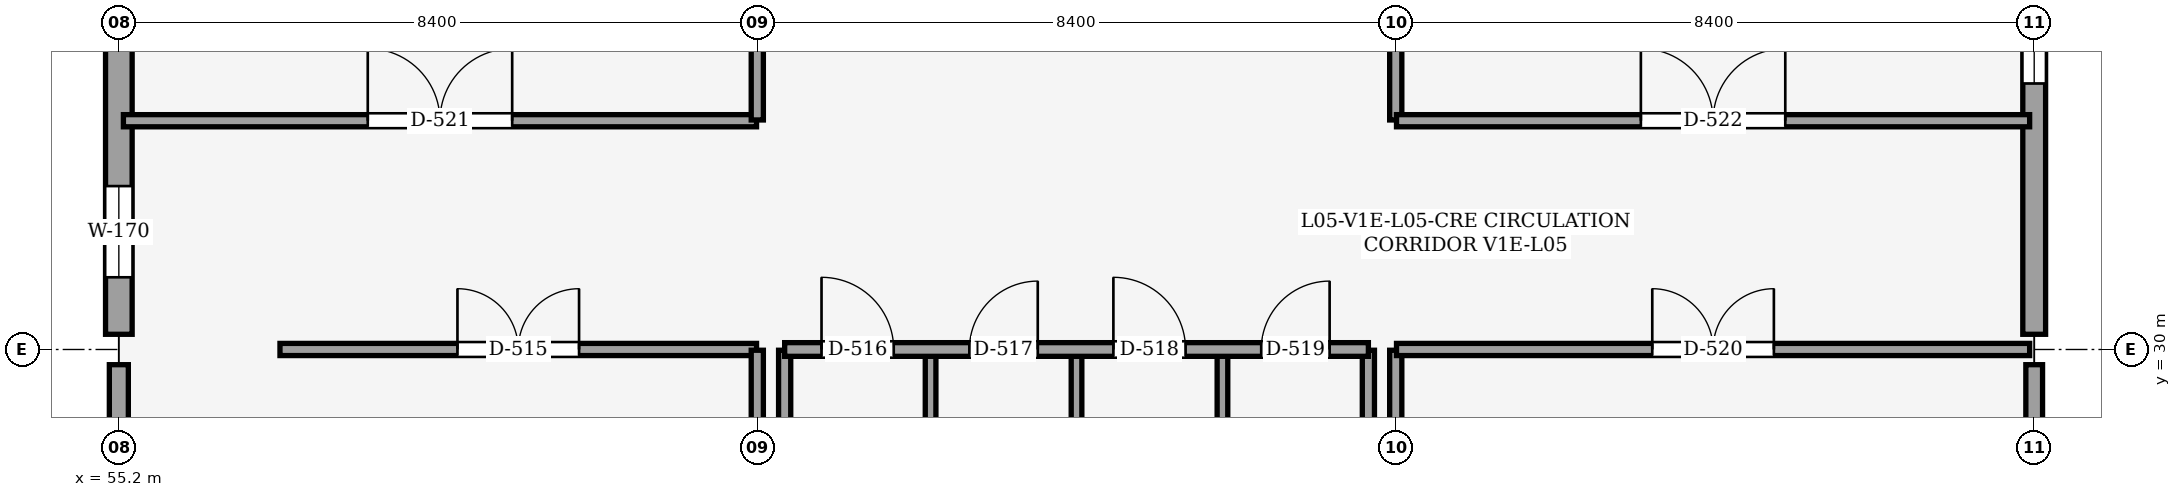
"""IFC4 building model, lengths in metres.
Left out: names, types, materials, properties, quantities, classifications, styles, units other than length and angle.
Written with IfcOpenShell. Run it as: python <this file> out.ifc"""

import sys

from ifc_helpers import new_model, si_unit, direction, frame, frame_2d, origin, place, context, subcontext, project, spatial, rectangle, extrude, element, fill, save


model = new_model("IFC4")
c1 = context("Model", 3, precision=1e-05, world=origin(), true_north=direction((0.0, 1.0)))
c2 = subcontext(c1, "Body", "Model", "MODEL_VIEW")
j1 = project(units=[si_unit("LENGTHUNIT", "METRE"), si_unit("PLANEANGLEUNIT", "RADIAN")], contexts=[c1])
p1 = place(None, origin())
s1 = spatial("IfcSite", under=j1, at=p1, CompositionType="ELEMENT")
p2 = place(p1, origin())
s2 = spatial("IfcBuilding", under=s1, at=p2, CompositionType="ELEMENT")
p3 = place(p2, frame((0.0, 0.0, 24.6)))
s3 = spatial("IfcBuildingStorey", under=s2, at=p3, CompositionType="ELEMENT", Elevation=24.6)
p4 = place(p3, frame((55.2, 21.752, 0.0), z_axis=(0.0, 0.0, 1.0), x_axis=(0.0, 1.0, 0.0)))
e1 = element("IfcWall", 1, at=p4, inside=s3, PredefinedType="SOLIDWALL", context=c2, shape_type="SweptSolid", body=[
    extrude(rectangle(XDim=8.048, YDim=0.25, at=frame_2d((4.024, 0.0))), origin(), (0.0, 0.0, 1.0), 3.524),
])
p5 = place(p4, frame((0.75, 0.0, 0.9)))
e2 = element("IfcOpeningElement", 2, at=p5, cuts=e1, PredefinedType="OPENING", context=c2, shape_type="SweptSolid", body=[
    extrude(rectangle(XDim=1.2, YDim=1.5, at=frame_2d((0.6, 0.75))), frame((0.0, 0.135, 0.0), z_axis=(0.0, -1.0, 0.0), x_axis=(1.0, 0.0, 0.0)), (0.0, 0.0, 1.0), 0.271),
])
p6 = place(p3, frame((55.2, 30.2, 0.0), z_axis=(0.0, 0.0, 1.0), x_axis=(0.0, 1.0, 0.0)))
e3 = element("IfcWall", 3, at=p6, inside=s3, PredefinedType="SOLIDWALL", context=c2, shape_type="SweptSolid", body=[
    extrude(rectangle(XDim=8.0, YDim=0.35, at=frame_2d((4.0, 0.0))), origin(), (0.0, 0.0, 1.0), 3.524),
])
p7 = place(p6, frame((0.75, 0.0, 0.9)))
e4 = element("IfcOpeningElement", 4, at=p7, cuts=e3, PredefinedType="OPENING", context=c2, shape_type="SweptSolid", body=[
    extrude(rectangle(XDim=1.2, YDim=1.5, at=frame_2d((0.6, 0.75))), frame((0.0, 0.185, 0.0), z_axis=(0.0, -1.0, 0.0), x_axis=(1.0, 0.0, 0.0)), (0.0, 0.0, 1.0), 0.371),
])
p8 = place(p3, frame((80.4, 29.8, 0.0), z_axis=(0.0, 0.0, 1.0), x_axis=(0.0, -1.0, 0.0)))
e5 = element("IfcWall", 5, at=p8, inside=s3, PredefinedType="SOLIDWALL", context=c2, shape_type="SweptSolid", body=[
    extrude(rectangle(XDim=8.098, YDim=0.22, at=frame_2d((4.049, 0.0))), origin(), (0.0, 0.0, 1.0), 3.524),
])
p9 = place(p8, frame((0.75, 0.0, 0.9)))
e6 = element("IfcOpeningElement", 6, at=p9, cuts=e5, PredefinedType="OPENING", context=c2, shape_type="SweptSolid", body=[
    extrude(rectangle(XDim=1.2, YDim=1.5, at=frame_2d((0.6, 0.75))), frame((0.0, 0.12, 0.0), z_axis=(0.0, -1.0, 0.0), x_axis=(1.0, 0.0, 0.0)), (0.0, 0.0, 1.0), 0.24),
])
p10 = place(p3, frame((80.4, 38.2, 0.0), z_axis=(0.0, 0.0, 1.0), x_axis=(0.0, -1.0, 0.0)))
e7 = element("IfcWall", 7, at=p10, inside=s3, PredefinedType="SOLIDWALL", context=c2, shape_type="SweptSolid", body=[
    extrude(rectangle(XDim=8.0, YDim=0.3, at=frame_2d((4.0, 0.0))), origin(), (0.0, 0.0, 1.0), 3.524),
])
p11 = place(p10, frame((3.3, 0.0, 0.9)))
e8 = element("IfcOpeningElement", 8, at=p11, cuts=e7, PredefinedType="OPENING", context=c2, shape_type="SweptSolid", body=[
    extrude(rectangle(XDim=1.4, YDim=1.75, at=frame_2d((0.7, 0.875))), frame((0.0, 0.16, 0.0), z_axis=(0.0, -1.0, 0.0), x_axis=(1.0, 0.0, 0.0)), (0.0, 0.0, 1.0), 0.321),
])
p12 = place(p3, frame((57.32, 30.0, 0.0), z_axis=(0.0, 0.0, 1.0), x_axis=(1.0, 0.0, 0.0)))
e9 = element("IfcWall", 9, at=p12, inside=s3, PredefinedType="PARTITIONING", context=c2, shape_type="SweptSolid", body=[
    extrude(rectangle(XDim=6.27, YDim=0.16, at=frame_2d((3.135, 0.0))), origin(), (0.0, 0.0, 1.0), 4.58),
])
p13 = place(p12, frame((2.335, 0.0, 0.0)))
e10 = element("IfcOpeningElement", 10, at=p13, cuts=e9, PredefinedType="OPENING", context=c2, shape_type="SweptSolid", body=[
    extrude(rectangle(XDim=1.6, YDim=2.35, at=frame_2d((0.8, 1.175))), frame((0.0, 0.09, 0.0), z_axis=(0.0, -1.0, 0.0), x_axis=(1.0, 0.0, 0.0)), (0.0, 0.0, 1.0), 0.18),
])
p14 = place(p3, frame((63.6, 21.767, 0.0), z_axis=(0.0, 0.0, 1.0), x_axis=(0.0, 1.0, 0.0)))
e11 = element("IfcWall", 11, at=p14, inside=s3, PredefinedType="PARTITIONING", context=c2, shape_type="SweptSolid", body=[
    extrude(rectangle(XDim=8.223, YDim=0.16, at=frame_2d((4.111, 0.0))), origin(), (0.0, 0.0, 1.0), 3.524),
])
for number, where, z_axis, x_axis in (
    (12, (65.88, 21.63, 0.0), (0.0, 0.0, 1.0), (0.0, 1.0, 0.0)),
    (13, (67.8, 21.63, 0.0), (0.0, 0.0, 1.0), (0.0, 1.0, 0.0)),
    (14, (69.72, 21.63, 0.0), (0.0, 0.0, 1.0), (0.0, 1.0, 0.0)),
):
    element("IfcWall", number, at=place(p3, frame(where, z_axis=z_axis, x_axis=x_axis)), inside=s3, PredefinedType="PARTITIONING", context=c2, shape_type="SweptSolid", body=[
        extrude(rectangle(XDim=8.36, YDim=0.14, at=frame_2d((4.18, 0.0))), origin(), (0.0, 0.0, 1.0), 4.58),
    ])
for number, where, z_axis, x_axis in (
    (15, (63.96, 21.63, 0.0), (0.0, 0.0, 1.0), (0.0, 1.0, 0.0)),
    (16, (71.64, 21.63, 0.0), (0.0, 0.0, 1.0), (0.0, 1.0, 0.0)),
):
    element("IfcWall", number, at=place(p3, frame(where, z_axis=z_axis, x_axis=x_axis)), inside=s3, PredefinedType="PARTITIONING", context=c2, shape_type="SweptSolid", body=[
        extrude(rectangle(XDim=8.36, YDim=0.16, at=frame_2d((4.18, 0.0))), origin(), (0.0, 0.0, 1.0), 4.58),
    ])
p15 = place(p3, frame((63.96, 30.0, 0.0), z_axis=(0.0, 0.0, 1.0), x_axis=(1.0, 0.0, 0.0)))
e17 = element("IfcWall", 17, at=p15, inside=s3, PredefinedType="PARTITIONING", context=c2, shape_type="SweptSolid", body=[
    extrude(rectangle(XDim=7.68, YDim=0.18, at=frame_2d((3.84, 0.0))), origin(), (0.0, 0.0, 1.0), 4.58),
])
p16 = place(p15, frame((0.485, 0.0, 0.0)))
e18 = element("IfcOpeningElement", 18, at=p16, cuts=e17, PredefinedType="OPENING", context=c2, shape_type="SweptSolid", body=[
    extrude(rectangle(XDim=0.95, YDim=2.1, at=frame_2d((0.475, 1.05))), frame((0.0, 0.1, 0.0), z_axis=(0.0, -1.0, 0.0), x_axis=(1.0, 0.0, 0.0)), (0.0, 0.0, 1.0), 0.2),
])
p17 = place(p15, frame((2.43, 0.0, 0.0)))
e19 = element("IfcOpeningElement", 19, at=p17, cuts=e17, PredefinedType="OPENING", context=c2, shape_type="SweptSolid", body=[
    extrude(rectangle(XDim=0.9, YDim=2.1, at=frame_2d((0.45, 1.05))), frame((0.0, 0.1, 0.0), z_axis=(0.0, -1.0, 0.0), x_axis=(1.0, 0.0, 0.0)), (0.0, 0.0, 1.0), 0.2),
])
p18 = place(p15, frame((4.325, 0.0, 0.0)))
e20 = element("IfcOpeningElement", 20, at=p18, cuts=e17, PredefinedType="OPENING", context=c2, shape_type="SweptSolid", body=[
    extrude(rectangle(XDim=0.95, YDim=2.1, at=frame_2d((0.475, 1.05))), frame((0.0, 0.1, 0.0), z_axis=(0.0, -1.0, 0.0), x_axis=(1.0, 0.0, 0.0)), (0.0, 0.0, 1.0), 0.2),
])
p19 = place(p15, frame((6.27, 0.0, 0.0)))
e21 = element("IfcOpeningElement", 21, at=p19, cuts=e17, PredefinedType="OPENING", context=c2, shape_type="SweptSolid", body=[
    extrude(rectangle(XDim=0.9, YDim=2.1, at=frame_2d((0.45, 1.05))), frame((0.0, 0.1, 0.0), z_axis=(0.0, -1.0, 0.0), x_axis=(1.0, 0.0, 0.0)), (0.0, 0.0, 1.0), 0.2),
])
p20 = place(p3, frame((72.0, 21.742, 0.0), z_axis=(0.0, 0.0, 1.0), x_axis=(0.0, 1.0, 0.0)))
e22 = element("IfcWall", 22, at=p20, inside=s3, PredefinedType="PARTITIONING", context=c2, shape_type="SweptSolid", body=[
    extrude(rectangle(XDim=8.248, YDim=0.16, at=frame_2d((4.124, 0.0))), origin(), (0.0, 0.0, 1.0), 3.524),
])
p21 = place(p3, frame((72.01, 30.0, 0.0), z_axis=(0.0, 0.0, 1.0), x_axis=(1.0, 0.0, 0.0)))
e23 = element("IfcWall", 23, at=p21, inside=s3, PredefinedType="PARTITIONING", context=c2, shape_type="SweptSolid", body=[
    extrude(rectangle(XDim=8.33, YDim=0.16, at=frame_2d((4.165, 0.0))), origin(), (0.0, 0.0, 1.0), 4.58),
])
p22 = place(p21, frame((3.365, 0.0, 0.0)))
e24 = element("IfcOpeningElement", 24, at=p22, cuts=e23, PredefinedType="OPENING", context=c2, shape_type="SweptSolid", body=[
    extrude(rectangle(XDim=1.6, YDim=2.35, at=frame_2d((0.8, 1.175))), frame((0.0, 0.09, 0.0), z_axis=(0.0, -1.0, 0.0), x_axis=(1.0, 0.0, 0.0)), (0.0, 0.0, 1.0), 0.18),
])
p23 = place(p3, frame((55.26, 33.01, 0.0), z_axis=(0.0, 0.0, 1.0), x_axis=(1.0, 0.0, 0.0)))
e25 = element("IfcWall", 25, at=p23, inside=s3, PredefinedType="PARTITIONING", context=c2, shape_type="SweptSolid", body=[
    extrude(rectangle(XDim=8.33, YDim=0.16, at=frame_2d((4.165, 0.0))), origin(), (0.0, 0.0, 1.0), 4.58),
])
p24 = place(p23, frame((3.215, 0.0, 0.0)))
e26 = element("IfcOpeningElement", 26, at=p24, cuts=e25, PredefinedType="OPENING", context=c2, shape_type="SweptSolid", body=[
    extrude(rectangle(XDim=1.9, YDim=2.45, at=frame_2d((0.95, 1.225))), frame((0.0, 0.09, 0.0), z_axis=(0.0, -1.0, 0.0), x_axis=(1.0, 0.0, 0.0)), (0.0, 0.0, 1.0), 0.18),
])
for number, where, z_axis, x_axis in (
    (27, (63.6, 33.02, 0.0), (0.0, 0.0, 1.0), (0.0, 1.0, 0.0)),
    (28, (72.0, 33.02, 0.0), (0.0, 0.0, 1.0), (0.0, 1.0, 0.0)),
):
    element("IfcWall", number, at=place(p3, frame(where, z_axis=z_axis, x_axis=x_axis)), inside=s3, PredefinedType="PARTITIONING", context=c2, shape_type="SweptSolid", body=[
        extrude(rectangle(XDim=5.35, YDim=0.16, at=frame_2d((2.675, 0.0))), origin(), (0.0, 0.0, 1.0), 3.524),
    ])
p25 = place(p3, frame((72.01, 33.01, 0.0), z_axis=(0.0, 0.0, 1.0), x_axis=(1.0, 0.0, 0.0)))
e29 = element("IfcWall", 29, at=p25, inside=s3, PredefinedType="PARTITIONING", context=c2, shape_type="SweptSolid", body=[
    extrude(rectangle(XDim=8.33, YDim=0.16, at=frame_2d((4.165, 0.0))), origin(), (0.0, 0.0, 1.0), 4.58),
])
p26 = place(p25, frame((3.215, 0.0, 0.0)))
e30 = element("IfcOpeningElement", 30, at=p26, cuts=e29, PredefinedType="OPENING", context=c2, shape_type="SweptSolid", body=[
    extrude(rectangle(XDim=1.9, YDim=2.45, at=frame_2d((0.95, 1.225))), frame((0.0, 0.09, 0.0), z_axis=(0.0, -1.0, 0.0), x_axis=(1.0, 0.0, 0.0)), (0.0, 0.0, 1.0), 0.18),
])
p27 = place(p7, origin())
e31 = element("IfcWindow", 31, at=p27, inside=s3, PartitioningType="SINGLE_PANEL", PredefinedType="WINDOW", context=c2, shape_type="SweptSolid", body=[
    extrude(rectangle(XDim=1.2, YDim=1.5, at=frame_2d((0.6, 0.75))), frame((0.0, 0.03, 0.0), z_axis=(0.0, -1.0, 0.0), x_axis=(1.0, 0.0, 0.0)), (0.0, 0.0, 1.0), 0.06),
])
fill(e4, e31)
p28 = place(p11, origin())
e32 = element("IfcWindow", 32, at=p28, inside=s3, PartitioningType="SINGLE_PANEL", PredefinedType="WINDOW", context=c2, shape_type="SweptSolid", body=[
    extrude(rectangle(XDim=1.4, YDim=1.75, at=frame_2d((0.7, 0.875))), frame((0.0, 0.03, 0.0), z_axis=(0.0, -1.0, 0.0), x_axis=(1.0, 0.0, 0.0)), (0.0, 0.0, 1.0), 0.06),
])
fill(e8, e32)
p29 = place(p13, origin())
e33 = element("IfcDoor", 33, at=p29, inside=s3, OperationType="DOUBLE_DOOR_SINGLE_SWING", PredefinedType="DOOR", context=c2, shape_type="SweptSolid", body=[
    extrude(rectangle(XDim=1.6, YDim=2.35, at=frame_2d((0.8, 1.175))), frame((0.0, 0.025, 0.0), z_axis=(0.0, -1.0, 0.0), x_axis=(1.0, 0.0, 0.0)), (0.0, 0.0, 1.0), 0.05),
])
fill(e10, e33)
p30 = place(p16, origin())
e34 = element("IfcDoor", 34, at=p30, inside=s3, OperationType="SINGLE_SWING_LEFT", PredefinedType="DOOR", context=c2, shape_type="SweptSolid", body=[
    extrude(rectangle(XDim=0.95, YDim=2.1, at=frame_2d((0.475, 1.05))), frame((0.0, 0.025, 0.0), z_axis=(0.0, -1.0, 0.0), x_axis=(1.0, 0.0, 0.0)), (0.0, 0.0, 1.0), 0.05),
])
fill(e18, e34)
p31 = place(p17, origin())
e35 = element("IfcDoor", 35, at=p31, inside=s3, OperationType="SINGLE_SWING_RIGHT", PredefinedType="DOOR", context=c2, shape_type="SweptSolid", body=[
    extrude(rectangle(XDim=0.9, YDim=2.1, at=frame_2d((0.45, 1.05))), frame((0.0, 0.025, 0.0), z_axis=(0.0, -1.0, 0.0), x_axis=(1.0, 0.0, 0.0)), (0.0, 0.0, 1.0), 0.05),
])
fill(e19, e35)
p32 = place(p18, origin())
e36 = element("IfcDoor", 36, at=p32, inside=s3, OperationType="SINGLE_SWING_LEFT", PredefinedType="DOOR", context=c2, shape_type="SweptSolid", body=[
    extrude(rectangle(XDim=0.95, YDim=2.1, at=frame_2d((0.475, 1.05))), frame((0.0, 0.025, 0.0), z_axis=(0.0, -1.0, 0.0), x_axis=(1.0, 0.0, 0.0)), (0.0, 0.0, 1.0), 0.05),
])
fill(e20, e36)
p33 = place(p19, origin())
e37 = element("IfcDoor", 37, at=p33, inside=s3, OperationType="SINGLE_SWING_RIGHT", PredefinedType="DOOR", context=c2, shape_type="SweptSolid", body=[
    extrude(rectangle(XDim=0.9, YDim=2.1, at=frame_2d((0.45, 1.05))), frame((0.0, 0.025, 0.0), z_axis=(0.0, -1.0, 0.0), x_axis=(1.0, 0.0, 0.0)), (0.0, 0.0, 1.0), 0.05),
])
fill(e21, e37)
p34 = place(p22, origin())
e38 = element("IfcDoor", 38, at=p34, inside=s3, OperationType="DOUBLE_DOOR_SINGLE_SWING", PredefinedType="DOOR", context=c2, shape_type="SweptSolid", body=[
    extrude(rectangle(XDim=1.6, YDim=2.35, at=frame_2d((0.8, 1.175))), frame((0.0, 0.025, 0.0), z_axis=(0.0, -1.0, 0.0), x_axis=(1.0, 0.0, 0.0)), (0.0, 0.0, 1.0), 0.05),
])
fill(e24, e38)
p35 = place(p24, origin())
e39 = element("IfcDoor", 39, at=p35, inside=s3, OperationType="DOUBLE_DOOR_SINGLE_SWING", PredefinedType="DOOR", context=c2, shape_type="SweptSolid", body=[
    extrude(rectangle(XDim=1.9, YDim=2.45, at=frame_2d((0.95, 1.225))), frame((0.0, 0.025, 0.0), z_axis=(0.0, -1.0, 0.0), x_axis=(1.0, 0.0, 0.0)), (0.0, 0.0, 1.0), 0.05),
])
fill(e26, e39)
p36 = place(p26, origin())
e40 = element("IfcDoor", 40, at=p36, inside=s3, OperationType="DOUBLE_DOOR_SINGLE_SWING", PredefinedType="DOOR", context=c2, shape_type="SweptSolid", body=[
    extrude(rectangle(XDim=1.9, YDim=2.45, at=frame_2d((0.95, 1.225))), frame((0.0, 0.025, 0.0), z_axis=(0.0, -1.0, 0.0), x_axis=(1.0, 0.0, 0.0)), (0.0, 0.0, 1.0), 0.05),
])
fill(e30, e40)
save(model, sys.argv[1])
